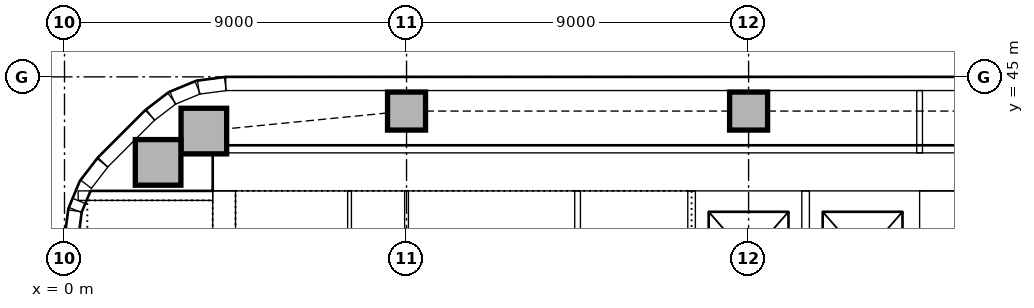
"""IFC4 building model, lengths in metres.
Left out: names, types, materials, properties, quantities, classifications, styles, units other than length and angle.
Written with IfcOpenShell. Run it as: python <this file> out.ifc"""

import sys

from ifc_helpers import new_model, si_unit, direction, frame, frame_2d, origin, origin_2d, place, context, subcontext, project, spatial, rectangle, extrude, element, fill, save


model = new_model("IFC4")
c1 = context("Model", 3, precision=1e-05, world=origin(), true_north=direction((0.0, 1.0)))
c2 = subcontext(c1, "Body", "Model", "MODEL_VIEW")
j1 = project(units=[si_unit("LENGTHUNIT", "METRE"), si_unit("PLANEANGLEUNIT", "RADIAN")], contexts=[c1])
p1 = place(None, origin())
s1 = spatial("IfcSite", under=j1, at=p1, CompositionType="ELEMENT")
p2 = place(p1, origin())
s2 = spatial("IfcBuilding", under=s1, at=p2, CompositionType="ELEMENT")
p3 = place(p2, frame((0.0, 0.0, 26.0)))
s3 = spatial("IfcBuildingStorey", under=s2, at=p3, CompositionType="ELEMENT", Elevation=26.0)
p4 = place(p3, frame((23.5, 42.5, 0.0), z_axis=(0.0, 0.0, 1.0), x_axis=(-1.0, 0.0, 0.0)))
e1 = element("IfcWall", 1, at=p4, inside=s3, PredefinedType="SOLIDWALL", context=c2, shape_type="SweptSolid", body=[
    extrude(rectangle(XDim=19.6, YDim=1.0, at=frame_2d((9.8, 0.0))), origin(), (0.0, 0.0, 1.0), 4.0),
])
p5 = place(p3, frame((23.0, 31.5, 0.0), z_axis=(0.0, 0.0, 1.0), x_axis=(0.0, 1.0, 0.0)))
e2 = element("IfcWall", 2, at=p5, inside=s3, PredefinedType="SOLIDWALL", context=c2, shape_type="SweptSolid", body=[
    extrude(rectangle(XDim=10.5, YDim=1.0, at=frame_2d((5.25, 0.0))), origin(), (0.0, 0.0, 1.0), 4.0),
])
p6 = place(p5, frame((3.15, 0.0, 0.0)))
e3 = element("IfcOpeningElement", 3, at=p6, cuts=e2, PredefinedType="OPENING", context=c2, shape_type="SweptSolid", body=[
    extrude(rectangle(XDim=1.0, YDim=2.1, at=frame_2d((0.5, 1.05))), frame((0.0, 0.51, 0.0), z_axis=(0.0, -1.0, 0.0), x_axis=(1.0, 0.0, 0.0)), (0.0, 0.0, 1.0), 1.02),
])
p7 = place(p5, frame((5.2, 0.0, 0.0)))
e4 = element("IfcOpeningElement", 4, at=p7, cuts=e2, PredefinedType="OPENING", context=c2, shape_type="SweptSolid", body=[
    extrude(rectangle(XDim=1.0, YDim=2.1, at=frame_2d((0.5, 1.05))), frame((0.0, 0.51, 0.0), z_axis=(0.0, -1.0, 0.0), x_axis=(1.0, 0.0, 0.0)), (0.0, 0.0, 1.0), 1.02),
])
p8 = place(p3, frame((4.2, 42.0, 0.0), z_axis=(0.0, 0.0, 1.0), x_axis=(0.0, -1.0, 0.0)))
e5 = element("IfcWall", 5, at=p8, inside=s3, PredefinedType="SOLIDWALL", context=c2, shape_type="SweptSolid", body=[
    extrude(rectangle(XDim=10.5, YDim=0.6, at=frame_2d((5.25, 0.0))), origin(), (0.0, 0.0, 1.0), 4.0),
])
p9 = place(p8, frame((5.3, 0.0, 0.0)))
e6 = element("IfcOpeningElement", 6, at=p9, cuts=e5, PredefinedType="OPENING", context=c2, shape_type="SweptSolid", body=[
    extrude(rectangle(XDim=1.0, YDim=2.1, at=frame_2d((0.5, 1.05))), frame((0.0, 0.31, 0.0), z_axis=(0.0, -1.0, 0.0), x_axis=(1.0, 0.0, 0.0)), (0.0, 0.0, 1.0), 0.62),
])
p10 = place(p3, frame((3.9, 41.875, 0.0), z_axis=(0.0, 0.0, 1.0), x_axis=(-1.0, 0.0, 0.0)))
e7 = element("IfcWall", 7, at=p10, inside=s3, PredefinedType="SOLIDWALL", context=c2, shape_type="SweptSolid", body=[
    extrude(rectangle(XDim=3.54, YDim=0.25, at=frame_2d((1.77, 0.0))), origin(), (0.0, 0.0, 1.0), 4.0),
])
for number, where, z_axis, x_axis in (
    (8, (3.667, 43.574, 0.0), (0.0, 0.0, 1.0), (1.0, 0.0, 0.0)),
    (9, (2.463, 42.75, 0.0), (0.0, 0.0, 1.0), (1.0, 0.0, 0.0)),
):
    element("IfcColumn", number, at=place(p3, frame(where, z_axis=z_axis, x_axis=x_axis)), inside=s3, PredefinedType="COLUMN", context=c2, shape_type="SweptSolid", body=[
        extrude(rectangle(XDim=1.2, YDim=1.2, at=origin_2d()), origin(), (0.0, 0.0, 1.0), 3.85),
    ])
for number, where, z_axis, x_axis in (
    (10, (9.0, 44.1, 0.0), (0.0, 0.0, 1.0), (1.0, 0.0, 0.0)),
    (11, (18.0, 44.1, 0.0), (0.0, 0.0, 1.0), (1.0, 0.0, 0.0)),
):
    element("IfcColumn", number, at=place(p3, frame(where, z_axis=z_axis, x_axis=x_axis)), inside=s3, PredefinedType="COLUMN", context=c2, shape_type="SweptSolid", body=[
        extrude(rectangle(XDim=1.0, YDim=1.0, at=origin_2d()), origin(), (0.0, 0.0, 1.0), 3.85),
    ])
p11 = place(p3, frame((48.257, 44.82, 0.0), z_axis=(0.0, 0.0, 1.0), x_axis=(-1.0, 0.0, 0.0)))
e12 = element("IfcWall", 12, at=p11, inside=s3, PredefinedType="STANDARD", context=c2, shape_type="SweptSolid", body=[
    extrude(rectangle(XDim=44.015, YDim=0.36, at=frame_2d((22.007, 0.0))), origin(), (0.0, 0.0, 1.0), 3.85),
])
p12 = place(p11, frame((2.057, 0.0, 0.9)))
e13 = element("IfcOpeningElement", 13, at=p12, cuts=e12, PredefinedType="OPENING", context=c2, shape_type="SweptSolid", body=[
    extrude(rectangle(XDim=3.3, YDim=1.6, at=frame_2d((1.65, 0.8))), frame((0.0, 0.19, 0.0), z_axis=(0.0, -1.0, 0.0), x_axis=(1.0, 0.0, 0.0)), (0.0, 0.0, 1.0), 0.38),
])
p13 = place(p11, frame((7.607, 0.0, 0.0)))
e14 = element("IfcOpeningElement", 14, at=p13, cuts=e12, PredefinedType="OPENING", context=c2, shape_type="SweptSolid", body=[
    extrude(rectangle(XDim=1.8, YDim=2.4, at=frame_2d((0.9, 1.2))), frame((0.0, 0.19, 0.0), z_axis=(0.0, -1.0, 0.0), x_axis=(1.0, 0.0, 0.0)), (0.0, 0.0, 1.0), 0.38),
])
p14 = place(p11, frame((11.357, 0.0, 0.9)))
e15 = element("IfcOpeningElement", 15, at=p14, cuts=e12, PredefinedType="OPENING", context=c2, shape_type="SweptSolid", body=[
    extrude(rectangle(XDim=3.3, YDim=1.6, at=frame_2d((1.65, 0.8))), frame((0.0, 0.19, 0.0), z_axis=(0.0, -1.0, 0.0), x_axis=(1.0, 0.0, 0.0)), (0.0, 0.0, 1.0), 0.38),
])
p15 = place(p11, frame((15.857, 0.0, 0.9)))
e16 = element("IfcOpeningElement", 16, at=p15, cuts=e12, PredefinedType="OPENING", context=c2, shape_type="SweptSolid", body=[
    extrude(rectangle(XDim=3.3, YDim=1.6, at=frame_2d((1.65, 0.8))), frame((0.0, 0.19, 0.0), z_axis=(0.0, -1.0, 0.0), x_axis=(1.0, 0.0, 0.0)), (0.0, 0.0, 1.0), 0.38),
])
p16 = place(p11, frame((20.357, 0.0, 0.9)))
e17 = element("IfcOpeningElement", 17, at=p16, cuts=e12, PredefinedType="OPENING", context=c2, shape_type="SweptSolid", body=[
    extrude(rectangle(XDim=3.3, YDim=1.6, at=frame_2d((1.65, 0.8))), frame((0.0, 0.19, 0.0), z_axis=(0.0, -1.0, 0.0), x_axis=(1.0, 0.0, 0.0)), (0.0, 0.0, 1.0), 0.38),
])
p17 = place(p11, frame((25.957, 0.0, 0.9)))
e18 = element("IfcOpeningElement", 18, at=p17, cuts=e12, PredefinedType="OPENING", context=c2, shape_type="SweptSolid", body=[
    extrude(rectangle(XDim=1.8, YDim=1.6, at=frame_2d((0.9, 0.8))), frame((0.0, 0.19, 0.0), z_axis=(0.0, -1.0, 0.0), x_axis=(1.0, 0.0, 0.0)), (0.0, 0.0, 1.0), 0.38),
])
p18 = place(p11, frame((29.357, 0.0, 0.9)))
e19 = element("IfcOpeningElement", 19, at=p18, cuts=e12, PredefinedType="OPENING", context=c2, shape_type="SweptSolid", body=[
    extrude(rectangle(XDim=3.3, YDim=1.6, at=frame_2d((1.65, 0.8))), frame((0.0, 0.19, 0.0), z_axis=(0.0, -1.0, 0.0), x_axis=(1.0, 0.0, 0.0)), (0.0, 0.0, 1.0), 0.38),
])
p19 = place(p11, frame((33.857, 0.0, 0.9)))
e20 = element("IfcOpeningElement", 20, at=p19, cuts=e12, PredefinedType="OPENING", context=c2, shape_type="SweptSolid", body=[
    extrude(rectangle(XDim=3.3, YDim=1.6, at=frame_2d((1.65, 0.8))), frame((0.0, 0.19, 0.0), z_axis=(0.0, -1.0, 0.0), x_axis=(1.0, 0.0, 0.0)), (0.0, 0.0, 1.0), 0.38),
])
p20 = place(p11, frame((38.357, 0.0, 0.9)))
e21 = element("IfcOpeningElement", 21, at=p20, cuts=e12, PredefinedType="OPENING", context=c2, shape_type="SweptSolid", body=[
    extrude(rectangle(XDim=3.3, YDim=1.6, at=frame_2d((1.65, 0.8))), frame((0.0, 0.19, 0.0), z_axis=(0.0, -1.0, 0.0), x_axis=(1.0, 0.0, 0.0)), (0.0, 0.0, 1.0), 0.38),
])
p21 = place(p3, frame((2.249, 43.994, 0.0), z_axis=(0.0, 0.0, 1.0), x_axis=(-0.707106781187, -0.707106781187, 0.0)))
e22 = element("IfcWall", 22, at=p21, inside=s3, PredefinedType="STANDARD", context=c2, shape_type="SweptSolid", body=[
    extrude(rectangle(XDim=1.757, YDim=0.36, at=frame_2d((0.879, 0.0))), origin(), (0.0, 0.0, 1.0), 3.85),
])
for number, where, z_axis, x_axis in (
    (23, (4.231, 44.817, 0.0), (0.0, 0.0, 1.0), (-0.991, -0.131, 0.0)),
    (24, (3.503, 44.718, 0.0), (0.0, 0.0, 1.0), (-0.924, -0.383, 0.0)),
):
    element("IfcWall", number, at=place(p3, frame(where, z_axis=z_axis, x_axis=x_axis)), inside=s3, PredefinedType="STANDARD", context=c2, shape_type="SweptSolid", body=[
        extrude(rectangle(XDim=0.713, YDim=0.36, at=frame_2d((0.356, 0.0))), origin(), (0.0, 0.0, 1.0), 3.85),
    ])
for number, where, z_axis, x_axis in (
    (25, (2.825, 44.434, 0.0), (0.0, 0.0, 1.0), (-0.793, -0.609, 0.0)),
    (26, (1.0, 42.741, 0.0), (0.0, 0.0, 1.0), (-0.609, -0.793, 0.0)),
):
    element("IfcWall", number, at=place(p3, frame(where, z_axis=z_axis, x_axis=x_axis)), inside=s3, PredefinedType="STANDARD", context=c2, shape_type="SweptSolid", body=[
        extrude(rectangle(XDim=0.713, YDim=0.36, at=frame_2d((0.357, 0.0))), origin(), (0.0, 0.0, 1.0), 3.85),
    ])
p22 = place(p3, frame((0.381, 41.736, 0.0), z_axis=(0.0, 0.0, 1.0), x_axis=(-0.382773360986, -0.923842277729, 0.0)))
e27 = element("IfcWall", 27, at=p22, inside=s3, PredefinedType="STANDARD", context=c2, shape_type="SweptSolid", body=[
    extrude(rectangle(XDim=0.258, YDim=0.36, at=frame_2d((0.129, 0.0))), origin(), (0.0, 0.0, 1.0), 3.85),
])
p23 = place(p3, frame((0.276, 41.476, 0.0), z_axis=(0.0, 0.0, 1.0), x_axis=(-0.13055608231, -0.99144092581, 0.0)))
e28 = element("IfcWall", 28, at=p23, inside=s3, PredefinedType="STANDARD", context=c2, shape_type="SweptSolid", body=[
    extrude(rectangle(XDim=0.713, YDim=0.36, at=frame_2d((0.356, 0.0))), origin(), (0.0, 0.0, 1.0), 3.85),
])
for number, where, z_axis, x_axis in (
    (29, (16.5, 38.6, 0.0), (0.0, 0.0, 1.0), (0.0, 1.0, 0.0)),
    (30, (19.5, 38.6, 0.0), (0.0, 0.0, 1.0), (0.0, 1.0, 0.0)),
):
    element("IfcWall", number, at=place(p3, frame(where, z_axis=z_axis, x_axis=x_axis)), inside=s3, PredefinedType="PARTITIONING", context=c2, shape_type="SweptSolid", body=[
        extrude(rectangle(XDim=3.4, YDim=0.2, at=frame_2d((1.7, 0.0))), origin(), (0.0, 0.0, 1.0), 3.85),
    ])
p24 = place(p3, frame((22.5, 43.0, 0.0), z_axis=(0.0, 0.0, 1.0), x_axis=(0.0, 1.0, 0.0)))
e31 = element("IfcWall", 31, at=p24, inside=s3, PredefinedType="PARTITIONING", context=c2, shape_type="SweptSolid", body=[
    extrude(rectangle(XDim=1.64, YDim=0.15, at=frame_2d((0.82, 0.0))), origin(), (0.0, 0.0, 1.0), 3.85),
])
p25 = place(p24, frame((0.35, 0.0, 0.0)))
e32 = element("IfcOpeningElement", 32, at=p25, cuts=e31, PredefinedType="OPENING", context=c2, shape_type="SweptSolid", body=[
    extrude(rectangle(XDim=0.9, YDim=2.1, at=frame_2d((0.45, 1.05))), frame((0.0, 0.085, 0.0), z_axis=(0.0, -1.0, 0.0), x_axis=(1.0, 0.0, 0.0)), (0.0, 0.0, 1.0), 0.17),
])
p26 = place(p3, frame((13.5, 38.575, 0.0), z_axis=(0.0, 0.0, 1.0), x_axis=(0.0, 1.0, 0.0)))
e33 = element("IfcWall", 33, at=p26, inside=s3, PredefinedType="PARTITIONING", context=c2, shape_type="SweptSolid", body=[
    extrude(rectangle(XDim=3.425, YDim=0.15, at=frame_2d((1.712, 0.0))), origin(), (0.0, 0.0, 1.0), 3.85),
])
for number, where, z_axis, x_axis in (
    (34, (7.5, 38.575, 0.0), (0.0, 0.0, 1.0), (0.0, 1.0, 0.0)),
    (35, (9.0, 38.575, 0.0), (0.0, 0.0, 1.0), (0.0, 1.0, 0.0)),
):
    element("IfcWall", number, at=place(p3, frame(where, z_axis=z_axis, x_axis=x_axis)), inside=s3, PredefinedType="PARTITIONING", context=c2, shape_type="SweptSolid", body=[
        extrude(rectangle(XDim=3.425, YDim=0.1, at=frame_2d((1.712, 0.0))), origin(), (0.0, 0.0, 1.0), 3.85),
    ])
p27 = place(p17, origin())
e36 = element("IfcWindow", 36, at=p27, inside=s3, PartitioningType="SINGLE_PANEL", PredefinedType="WINDOW", context=c2, shape_type="SweptSolid", body=[
    extrude(rectangle(XDim=1.8, YDim=1.6, at=frame_2d((0.9, 0.8))), frame((0.0, 0.13, 0.0), z_axis=(0.0, -1.0, 0.0), x_axis=(1.0, 0.0, 0.0)), (0.0, 0.0, 1.0), 0.06),
])
fill(e18, e36)
p28 = place(p18, origin())
e37 = element("IfcWindow", 37, at=p28, inside=s3, PartitioningType="SINGLE_PANEL", PredefinedType="WINDOW", context=c2, shape_type="SweptSolid", body=[
    extrude(rectangle(XDim=3.3, YDim=1.6, at=frame_2d((1.65, 0.8))), frame((0.0, 0.13, 0.0), z_axis=(0.0, -1.0, 0.0), x_axis=(1.0, 0.0, 0.0)), (0.0, 0.0, 1.0), 0.06),
])
fill(e19, e37)
p29 = place(p19, origin())
e38 = element("IfcWindow", 38, at=p29, inside=s3, PartitioningType="SINGLE_PANEL", PredefinedType="WINDOW", context=c2, shape_type="SweptSolid", body=[
    extrude(rectangle(XDim=3.3, YDim=1.6, at=frame_2d((1.65, 0.8))), frame((0.0, 0.13, 0.0), z_axis=(0.0, -1.0, 0.0), x_axis=(1.0, 0.0, 0.0)), (0.0, 0.0, 1.0), 0.06),
])
fill(e20, e38)
p30 = place(p20, origin())
e39 = element("IfcWindow", 39, at=p30, inside=s3, PartitioningType="SINGLE_PANEL", PredefinedType="WINDOW", context=c2, shape_type="SweptSolid", body=[
    extrude(rectangle(XDim=3.3, YDim=1.6, at=frame_2d((1.65, 0.8))), frame((0.0, 0.13, 0.0), z_axis=(0.0, -1.0, 0.0), x_axis=(1.0, 0.0, 0.0)), (0.0, 0.0, 1.0), 0.06),
])
fill(e21, e39)
p31 = place(p25, origin())
e40 = element("IfcDoor", 40, at=p31, inside=s3, OperationType="SINGLE_SWING_LEFT", PredefinedType="DOOR", context=c2, shape_type="SweptSolid", body=[
    extrude(rectangle(XDim=0.9, YDim=2.1, at=frame_2d((0.45, 1.05))), frame((0.0, 0.025, 0.0), z_axis=(0.0, -1.0, 0.0), x_axis=(1.0, 0.0, 0.0)), (0.0, 0.0, 1.0), 0.05),
])
fill(e32, e40)
save(model, sys.argv[1])
